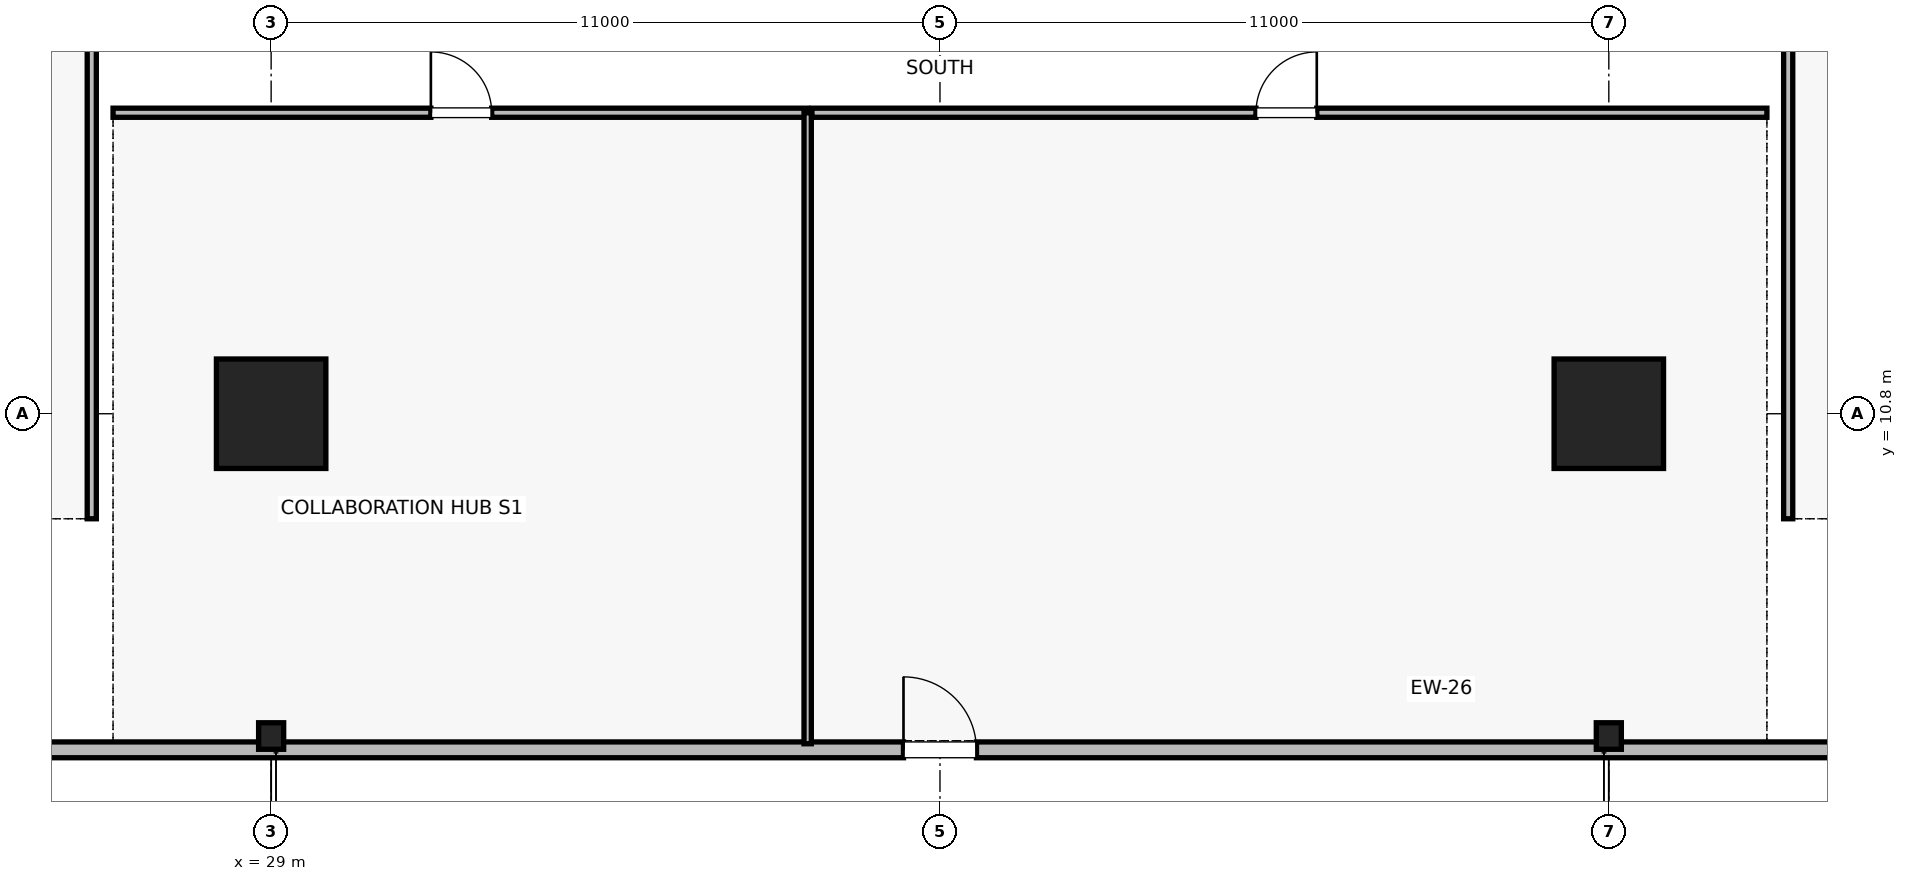
"""IFC4 building model, lengths in metres.
Left out: names, types, materials, properties, quantities, classifications, styles, units other than length and angle.
Written with IfcOpenShell. Run it as: python <this file> out.ifc"""

import sys

from ifc_helpers import new_model, si_unit, direction, frame, frame_2d, origin, origin_2d, place, context, subcontext, project, spatial, rectangle, i_section, extrude, element, fill, save


model = new_model("IFC4")
c1 = context("Model", 3, precision=1e-05, world=origin(), true_north=direction((0.0, 1.0)))
c2 = subcontext(c1, "Body", "Model", "MODEL_VIEW")
j1 = project(units=[si_unit("LENGTHUNIT", "METRE"), si_unit("PLANEANGLEUNIT", "RADIAN")], contexts=[c1])
p1 = place(None, origin())
s1 = spatial("IfcSite", under=j1, at=p1, CompositionType="ELEMENT")
p2 = place(p1, origin())
s2 = spatial("IfcBuilding", under=s1, at=p2, CompositionType="ELEMENT")
p3 = place(p2, frame((0.0, 0.0, 55.6)))
s3 = spatial("IfcBuildingStorey", under=s2, at=p3, CompositionType="ELEMENT", Elevation=55.6)
for number, where, z_axis, x_axis in (
    (1, (29.0, 10.8, 0.0), (0.0, 0.0, 1.0), (1.0, 0.0, 0.0)),
    (2, (51.0, 10.8, 0.0), (0.0, 0.0, 1.0), (1.0, 0.0, 0.0)),
):
    element("IfcColumn", number, at=place(p3, frame(where, z_axis=z_axis, x_axis=x_axis)), inside=s3, PredefinedType="COLUMN", context=c2, shape_type="SweptSolid", body=[
        extrude(rectangle(XDim=1.8, YDim=1.8, at=origin_2d()), origin(), (0.0, 0.0, 1.0), 4.0),
    ])
for number, where, z_axis, x_axis in (
    (3, (29.0, 5.5, 0.0), (0.0, 0.0, 1.0), (1.0, 0.0, 0.0)),
    (4, (51.0, 5.5, 0.0), (0.0, 0.0, 1.0), (1.0, 0.0, 0.0)),
):
    element("IfcColumn", number, at=place(p3, frame(where, z_axis=z_axis, x_axis=x_axis)), inside=s3, PredefinedType="COLUMN", context=c2, shape_type="SweptSolid", body=[
        extrude(i_section(OverallWidth=0.412, OverallDepth=0.437, WebThickness=0.036, FlangeThickness=0.058, FilletRadius=0.015, at=origin_2d()), origin(), (0.0, 0.0, 1.0), 4.0),
    ])
p4 = place(p3, frame((18.104, 5.273, 0.0), z_axis=(0.0, 0.0, 1.0), x_axis=(1.0, 0.0, 0.0)))
e5 = element("IfcWall", 5, at=p4, inside=s3, PredefinedType="PARAPET", context=c2, shape_type="SweptSolid", body=[
    extrude(rectangle(XDim=43.792, YDim=0.26, at=frame_2d((21.896, 0.0))), origin(), (0.0, 0.0, 1.0), 2.889),
])
p5 = place(p4, frame((4.2, 0.0, 0.85)))
e6 = element("IfcOpeningElement", 6, at=p5, cuts=e5, PredefinedType="OPENING", context=c2, shape_type="SweptSolid", body=[
    extrude(rectangle(XDim=1.8, YDim=2.2, at=frame_2d((0.9, 1.1))), frame((0.0, 0.13, 0.0), z_axis=(0.0, -1.0, 0.0), x_axis=(1.0, 0.0, 0.0)), (0.0, 0.0, 1.0), 0.26),
])
p6 = place(p4, frame((21.296, 0.0, 0.0)))
e7 = element("IfcOpeningElement", 7, at=p6, cuts=e5, PredefinedType="OPENING", context=c2, shape_type="SweptSolid", body=[
    extrude(rectangle(XDim=1.2, YDim=2.2, at=frame_2d((0.6, 1.1))), frame((0.0, 0.13, 0.0), z_axis=(0.0, -1.0, 0.0), x_axis=(1.0, 0.0, 0.0)), (0.0, 0.0, 1.0), 0.26),
])
p7 = place(p4, frame((37.792, 0.0, 0.85)))
e8 = element("IfcOpeningElement", 8, at=p7, cuts=e5, PredefinedType="OPENING", context=c2, shape_type="SweptSolid", body=[
    extrude(rectangle(XDim=1.8, YDim=2.2, at=frame_2d((0.9, 1.1))), frame((0.0, 0.13, 0.0), z_axis=(0.0, -1.0, 0.0), x_axis=(1.0, 0.0, 0.0)), (0.0, 0.0, 1.0), 0.26),
])
p8 = place(p3, frame((26.4, 15.75, 0.0), z_axis=(0.0, 0.0, 1.0), x_axis=(1.0, 0.0, 0.0)))
e9 = element("IfcWall", 9, at=p8, inside=s3, PredefinedType="PARTITIONING", context=c2, shape_type="SweptSolid", body=[
    extrude(rectangle(XDim=11.424, YDim=0.15, at=frame_2d((5.712, 0.0))), origin(), (0.0, 0.0, 1.0), 2.85),
])
p9 = place(p8, frame((5.227, 0.0, 0.0)))
e10 = element("IfcOpeningElement", 10, at=p9, cuts=e9, PredefinedType="OPENING", context=c2, shape_type="SweptSolid", body=[
    extrude(rectangle(XDim=1.0, YDim=2.15, at=frame_2d((0.5, 1.075))), frame((0.0, 0.075, 0.0), z_axis=(0.0, -1.0, 0.0), x_axis=(1.0, 0.0, 0.0)), (0.0, 0.0, 1.0), 0.15),
])
p10 = place(p3, frame((37.824, 5.373, 0.0), z_axis=(0.0, 0.0, 1.0), x_axis=(0.0, 1.0, 0.0)))
e11 = element("IfcWall", 11, at=p10, inside=s3, PredefinedType="PARTITIONING", context=c2, shape_type="SweptSolid", body=[
    extrude(rectangle(XDim=10.377, YDim=0.12, at=frame_2d((5.188, 0.0))), origin(), (0.0, 0.0, 1.0), 2.39),
])
p11 = place(p3, frame((37.894, 15.75, 0.0), z_axis=(0.0, 0.0, 1.0), x_axis=(1.0, 0.0, 0.0)))
e12 = element("IfcWall", 12, at=p11, inside=s3, PredefinedType="PARTITIONING", context=c2, shape_type="SweptSolid", body=[
    extrude(rectangle(XDim=15.706, YDim=0.15, at=frame_2d((7.853, 0.0))), origin(), (0.0, 0.0, 1.0), 2.85),
])
p12 = place(p11, frame((7.303, 0.0, 0.0)))
e13 = element("IfcOpeningElement", 13, at=p12, cuts=e12, PredefinedType="OPENING", context=c2, shape_type="SweptSolid", body=[
    extrude(rectangle(XDim=1.0, YDim=2.15, at=frame_2d((0.5, 1.075))), frame((0.0, 0.075, 0.0), z_axis=(0.0, -1.0, 0.0), x_axis=(1.0, 0.0, 0.0)), (0.0, 0.0, 1.0), 0.15),
])
p13 = place(p3, frame((26.05, 9.073, 0.0), z_axis=(0.0, 0.0, 1.0), x_axis=(0.0, 1.0, 0.0)))
e14 = element("IfcWall", 14, at=p13, inside=s3, PredefinedType="PARTITIONING", context=c2, shape_type="SweptSolid", body=[
    extrude(rectangle(XDim=21.376, YDim=0.15, at=frame_2d((10.688, 0.0))), origin(), (0.0, 0.0, 1.0), 2.85),
])
p14 = place(p13, frame((14.917, 0.0, 0.0)))
e15 = element("IfcOpeningElement", 15, at=p14, cuts=e14, PredefinedType="OPENING", context=c2, shape_type="SweptSolid", body=[
    extrude(rectangle(XDim=1.0, YDim=2.15, at=frame_2d((0.5, 1.075))), frame((0.0, 0.075, 0.0), z_axis=(0.0, -1.0, 0.0), x_axis=(1.0, 0.0, 0.0)), (0.0, 0.0, 1.0), 0.15),
])
p15 = place(p3, frame((53.95, 9.073, 0.0), z_axis=(0.0, 0.0, 1.0), x_axis=(0.0, 1.0, 0.0)))
e16 = element("IfcWall", 16, at=p15, inside=s3, PredefinedType="PARTITIONING", context=c2, shape_type="SweptSolid", body=[
    extrude(rectangle(XDim=10.319, YDim=0.15, at=frame_2d((5.16, 0.0))), origin(), (0.0, 0.0, 1.0), 2.85),
])
p16 = place(p15, frame((8.679, 0.0, 0.0)))
e17 = element("IfcOpeningElement", 17, at=p16, cuts=e16, PredefinedType="OPENING", context=c2, shape_type="SweptSolid", body=[
    extrude(rectangle(XDim=1.5, YDim=2.25, at=frame_2d((0.75, 1.125))), frame((0.0, 0.075, 0.0), z_axis=(0.0, -1.0, 0.0), x_axis=(1.0, 0.0, 0.0)), (0.0, 0.0, 1.0), 0.15),
])
p17 = place(p6, origin())
e18 = element("IfcDoor", 18, at=p17, inside=s3, OperationType="SINGLE_SWING_LEFT", PredefinedType="DOOR", context=c2, shape_type="SweptSolid", body=[
    extrude(rectangle(XDim=1.2, YDim=2.2, at=frame_2d((0.6, 1.1))), frame((0.0, 0.025, 0.0), z_axis=(0.0, -1.0, 0.0), x_axis=(1.0, 0.0, 0.0)), (0.0, 0.0, 1.0), 0.05),
])
fill(e7, e18)
p18 = place(p9, origin())
e19 = element("IfcDoor", 19, at=p18, inside=s3, OperationType="SINGLE_SWING_LEFT", PredefinedType="DOOR", context=c2, shape_type="SweptSolid", body=[
    extrude(rectangle(XDim=1.0, YDim=2.15, at=frame_2d((0.5, 1.075))), frame((0.0, 0.025, 0.0), z_axis=(0.0, -1.0, 0.0), x_axis=(1.0, 0.0, 0.0)), (0.0, 0.0, 1.0), 0.05),
])
fill(e10, e19)
p19 = place(p12, origin())
e20 = element("IfcDoor", 20, at=p19, inside=s3, OperationType="SINGLE_SWING_RIGHT", PredefinedType="DOOR", context=c2, shape_type="SweptSolid", body=[
    extrude(rectangle(XDim=1.0, YDim=2.15, at=frame_2d((0.5, 1.075))), frame((0.0, 0.025, 0.0), z_axis=(0.0, -1.0, 0.0), x_axis=(1.0, 0.0, 0.0)), (0.0, 0.0, 1.0), 0.05),
])
fill(e13, e20)
save(model, sys.argv[1])
